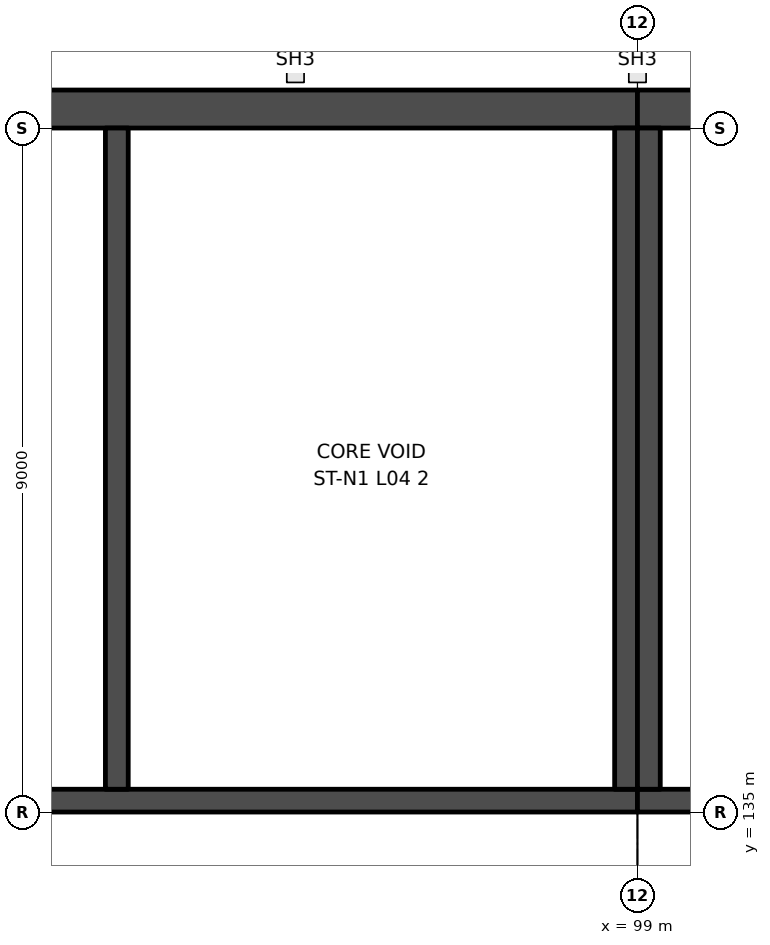
"""IFC4 building model, lengths in metres.
Left out: names, types, materials, properties, quantities, classifications, styles, units other than length and angle.
Written with IfcOpenShell. Run it as: python <this file> out.ifc"""

import sys

from ifc_helpers import new_model, si_unit, direction, frame, frame_2d, origin, place, context, subcontext, project, spatial, rectangle, extrude, element, save


model = new_model("IFC4")
c1 = context("Model", 3, precision=1e-05, world=origin(), true_north=direction((0.0, 1.0)))
c2 = subcontext(c1, "Body", "Model", "MODEL_VIEW")
j1 = project(units=[si_unit("LENGTHUNIT", "METRE"), si_unit("PLANEANGLEUNIT", "RADIAN")], contexts=[c1])
p1 = place(None, origin())
s1 = spatial("IfcSite", under=j1, at=p1, CompositionType="ELEMENT")
p2 = place(p1, origin())
s2 = spatial("IfcBuilding", under=s1, at=p2, CompositionType="ELEMENT")
p3 = place(p2, frame((0.0, 0.0, 28.0)))
s3 = spatial("IfcBuildingStorey", under=s2, at=p3, CompositionType="ELEMENT", Elevation=28.0)
p4 = place(p3, frame((81.0, 135.15, 0.0), z_axis=(0.0, 0.0, 1.0), x_axis=(1.0, 0.0, 0.0)))
e1 = element("IfcWall", 1, at=p4, inside=s3, PredefinedType="SHEAR", context=c2, shape_type="SweptSolid", body=[
    extrude(rectangle(XDim=18.0, YDim=0.3, at=frame_2d((9.0, 0.0))), origin(), (0.0, 0.0, 1.0), 5.5),
])
p5 = place(p4, frame((8.6, 0.0, 0.0)))
e2 = element("IfcOpeningElement", 2, at=p5, cuts=e1, PredefinedType="OPENING", context=c2, shape_type="SweptSolid", body=[
    extrude(rectangle(XDim=1.2, YDim=2.1, at=frame_2d((0.6, 1.05))), frame((0.0, 0.16, 0.0), z_axis=(0.0, -1.0, 0.0), x_axis=(1.0, 0.0, 0.0)), (0.0, 0.0, 1.0), 0.32),
])
p6 = place(p3, frame((81.0, 144.25, 0.0), z_axis=(0.0, 0.0, 1.0), x_axis=(1.0, 0.0, 0.0)))
e3 = element("IfcWall", 3, at=p6, inside=s3, PredefinedType="SHEAR", context=c2, shape_type="SweptSolid", body=[
    extrude(rectangle(XDim=18.0, YDim=0.5, at=frame_2d((9.0, 0.0))), origin(), (0.0, 0.0, 1.0), 5.5),
])
for number, where, z_axis, x_axis in (
    (4, (98.85, 135.3, 0.0), (0.0, 0.0, 1.0), (0.0, 1.0, 0.0)),
    (5, (92.15, 135.3, 0.0), (0.0, 0.0, 1.0), (0.0, 1.0, 0.0)),
):
    element("IfcWall", number, at=place(p3, frame(where, z_axis=z_axis, x_axis=x_axis)), inside=s3, PredefinedType="SHEAR", context=c2, shape_type="SweptSolid", body=[
        extrude(rectangle(XDim=8.7, YDim=0.3, at=frame_2d((4.35, 0.0))), origin(), (0.0, 0.0, 1.0), 5.5),
    ])
p7 = place(p3, frame((117.0, 135.15, 0.0), z_axis=(0.0, 0.0, 1.0), x_axis=(-1.0, 0.0, 0.0)))
e6 = element("IfcWall", 6, at=p7, inside=s3, PredefinedType="SHEAR", context=c2, shape_type="SweptSolid", body=[
    extrude(rectangle(XDim=18.0, YDim=0.3, at=frame_2d((9.0, 0.0))), origin(), (0.0, 0.0, 1.0), 5.5),
])
p8 = place(p7, frame((1.5, 0.0, 0.0)))
e7 = element("IfcOpeningElement", 7, at=p8, cuts=e6, PredefinedType="OPENING", context=c2, shape_type="SweptSolid", body=[
    extrude(rectangle(XDim=1.2, YDim=2.1, at=frame_2d((0.6, 1.05))), frame((0.0, 0.16, 0.0), z_axis=(0.0, -1.0, 0.0), x_axis=(1.0, 0.0, 0.0)), (0.0, 0.0, 1.0), 0.32),
])
p9 = place(p3, frame((117.0, 144.25, 0.0), z_axis=(0.0, 0.0, 1.0), x_axis=(-1.0, 0.0, 0.0)))
e8 = element("IfcWall", 8, at=p9, inside=s3, PredefinedType="SHEAR", context=c2, shape_type="SweptSolid", body=[
    extrude(rectangle(XDim=18.0, YDim=0.5, at=frame_2d((9.0, 0.0))), origin(), (0.0, 0.0, 1.0), 5.5),
])
p10 = place(p3, frame((99.15, 135.3, 0.0), z_axis=(0.0, 0.0, 1.0), x_axis=(0.0, 1.0, 0.0)))
e9 = element("IfcWall", 9, at=p10, inside=s3, PredefinedType="SHEAR", context=c2, shape_type="SweptSolid", body=[
    extrude(rectangle(XDim=8.7, YDim=0.3, at=frame_2d((4.35, 0.0))), origin(), (0.0, 0.0, 1.0), 5.5),
])
save(model, sys.argv[1])
